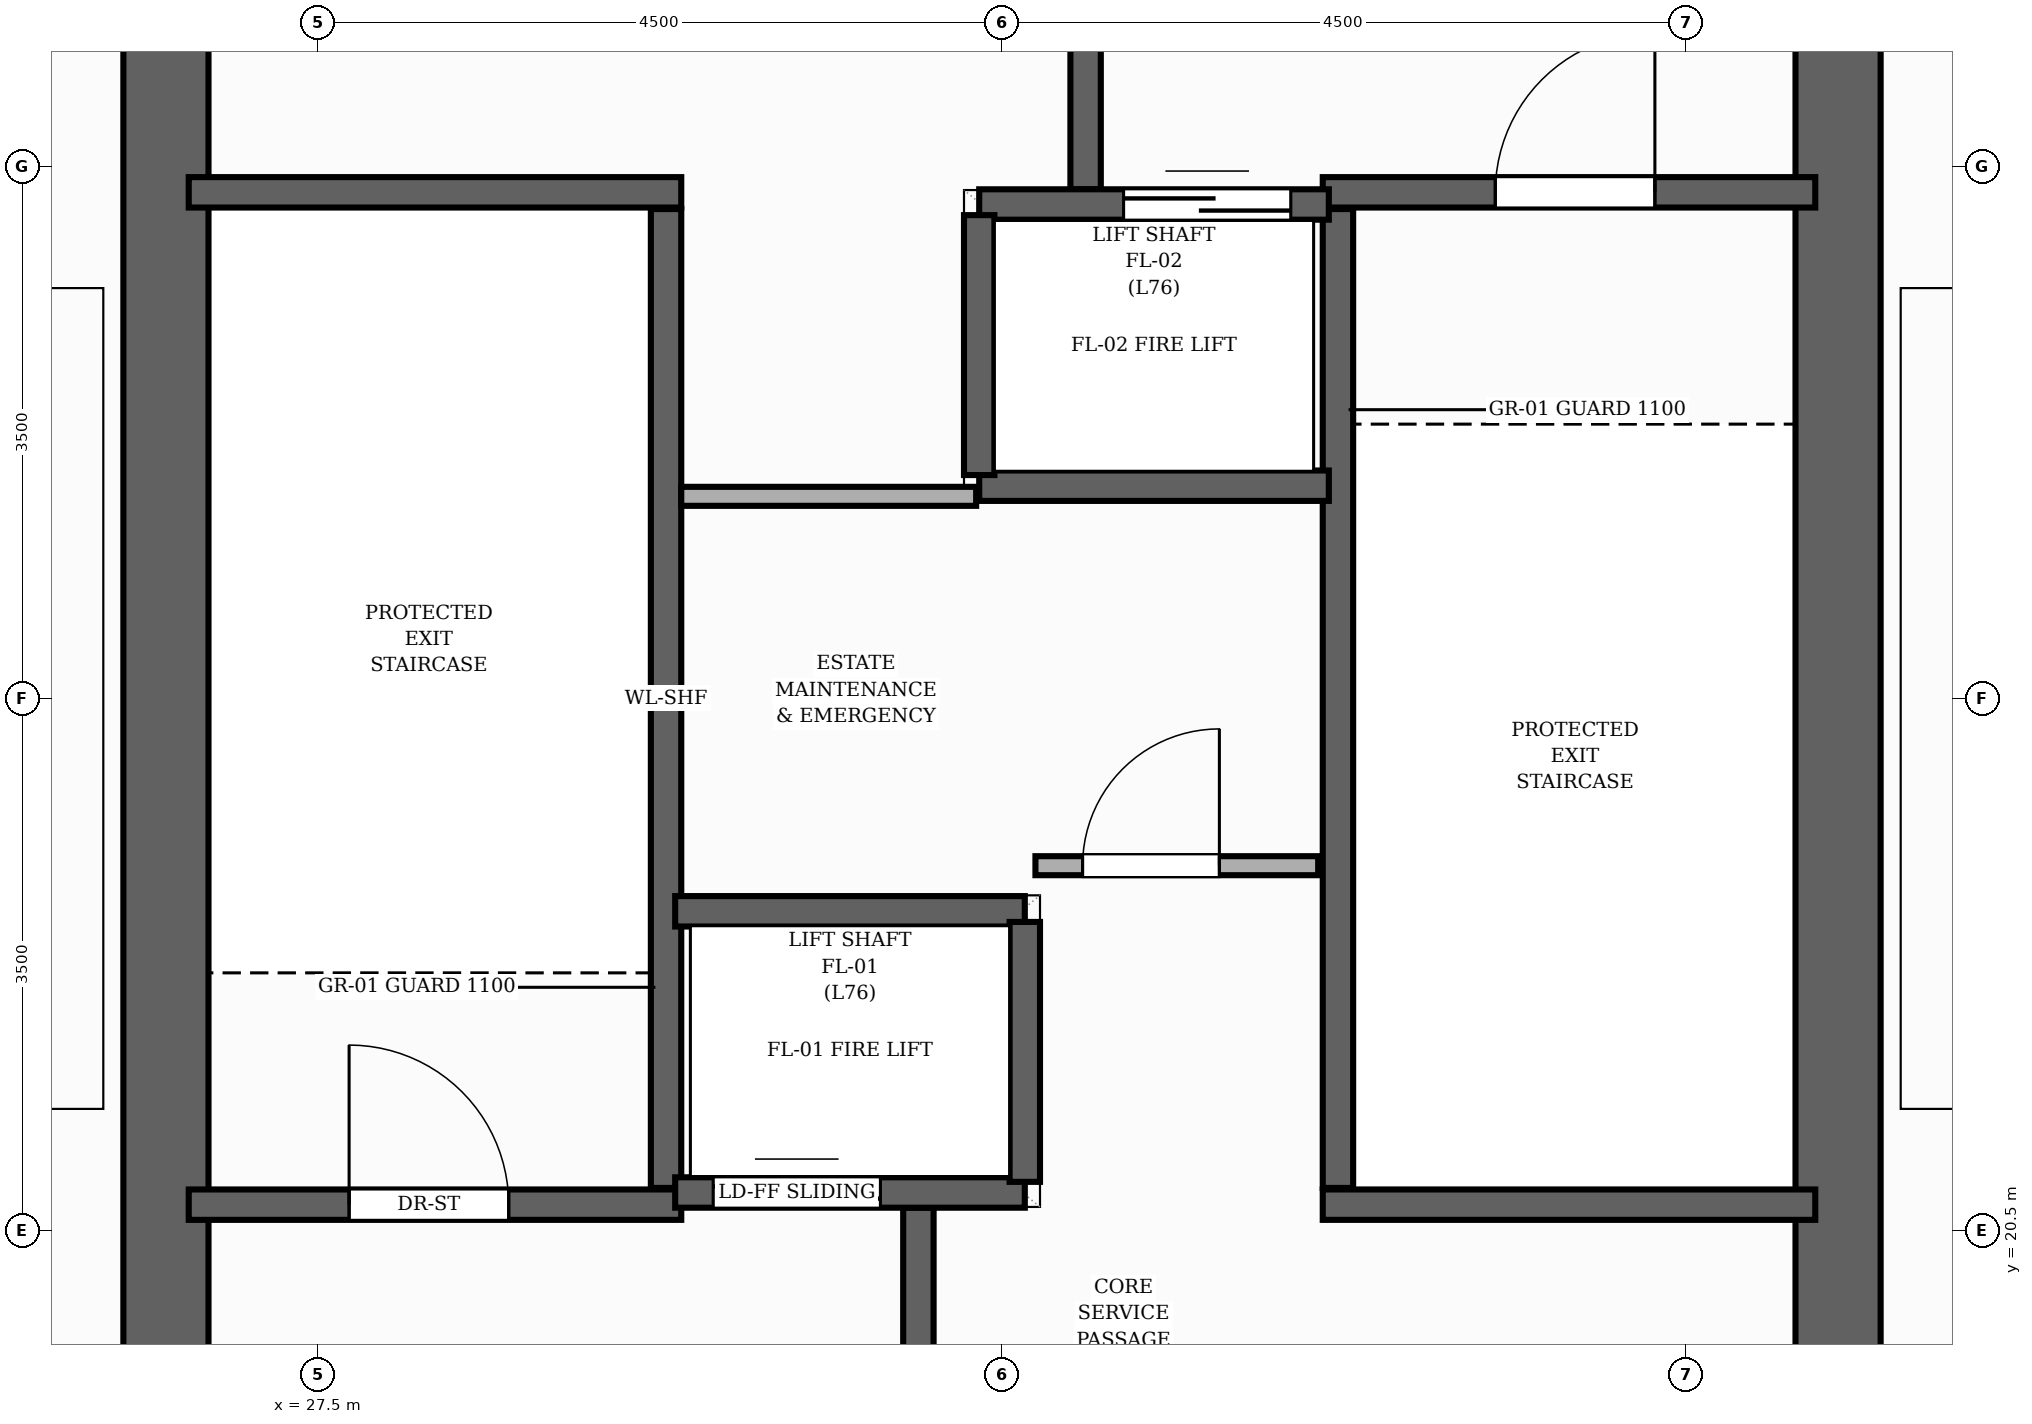
"""IFC4 building model, lengths in metres.
Left out: names, types, materials, properties, quantities, classifications, styles, units other than length and angle.
Written with IfcOpenShell. Run it as: python <this file> out.ifc"""

import sys

from ifc_helpers import new_model, si_unit, direction, frame, frame_2d, origin, place, context, subcontext, project, spatial, rectangle, extrude, element, fill, save


model = new_model("IFC4")
c1 = context("Model", 3, precision=1e-05, world=origin(), true_north=direction((0.0, 1.0)))
c2 = subcontext(c1, "Body", "Model", "MODEL_VIEW")
j1 = project(units=[si_unit("LENGTHUNIT", "METRE"), si_unit("PLANEANGLEUNIT", "RADIAN")], contexts=[c1])
p1 = place(None, origin())
s1 = spatial("IfcSite", under=j1, at=p1, CompositionType="ELEMENT")
p2 = place(p1, origin())
s2 = spatial("IfcBuilding", under=s1, at=p2, CompositionType="ELEMENT")
p3 = place(p2, frame((0.0, 0.0, 255.2)))
s3 = spatial("IfcBuildingStorey", under=s2, at=p3, CompositionType="ELEMENT", Elevation=255.2)
for number, where, z_axis, x_axis in (
    (1, (26.5, 17.28, 0.0), (0.0, 0.0, 1.0), (0.0, 1.0, 0.0)),
    (2, (37.5, 17.28, 0.0), (0.0, 0.0, 1.0), (0.0, 1.0, 0.0)),
):
    element("IfcWall", number, at=place(p3, frame(where, z_axis=z_axis, x_axis=x_axis)), inside=s3, PredefinedType="SHEAR", context=c2, shape_type="SweptSolid", body=[
        extrude(rectangle(XDim=13.44, YDim=0.56, at=frame_2d((6.72, 0.0))), origin(), (0.0, 0.0, 1.0), 4.16),
    ])
p4 = place(p3, frame((29.79, 20.78, 0.0), z_axis=(0.0, 0.0, 1.0), x_axis=(0.0, 1.0, 0.0)))
e3 = element("IfcWall", 3, at=p4, inside=s3, PredefinedType="SHEAR", context=c2, shape_type="SweptSolid", body=[
    extrude(rectangle(XDim=6.44, YDim=0.2, at=frame_2d((3.22, 0.0))), origin(), (0.0, 0.0, 1.0), 4.16),
])
p5 = place(p3, frame((26.65, 27.33, 0.0), z_axis=(0.0, 0.0, 1.0), x_axis=(1.0, 0.0, 0.0)))
e4 = element("IfcWall", 4, at=p5, inside=s3, PredefinedType="SHEAR", context=c2, shape_type="SweptSolid", body=[
    extrude(rectangle(XDim=3.24, YDim=0.2, at=frame_2d((1.62, 0.0))), origin(), (0.0, 0.0, 1.0), 4.16),
])
p6 = place(p3, frame((26.65, 20.67, 0.0), z_axis=(0.0, 0.0, 1.0), x_axis=(1.0, 0.0, 0.0)))
e5 = element("IfcWall", 5, at=p6, inside=s3, PredefinedType="SHEAR", context=c2, shape_type="SweptSolid", body=[
    extrude(rectangle(XDim=3.24, YDim=0.2, at=frame_2d((1.62, 0.0))), origin(), (0.0, 0.0, 1.0), 4.16),
])
p7 = place(p6, frame((1.055, 0.0, 0.0)))
e6 = element("IfcOpeningElement", 6, at=p7, cuts=e5, PredefinedType="OPENING", context=c2, shape_type="SweptSolid", body=[
    extrude(rectangle(XDim=1.05, YDim=2.15, at=frame_2d((0.525, 1.075))), frame((0.0, 0.11, 0.0), z_axis=(0.0, -1.0, 0.0), x_axis=(1.0, 0.0, 0.0)), (0.0, 0.0, 1.0), 0.22),
])
p8 = place(p3, frame((34.21, 20.78, 0.0), z_axis=(0.0, 0.0, 1.0), x_axis=(0.0, 1.0, 0.0)))
e7 = element("IfcWall", 7, at=p8, inside=s3, PredefinedType="SHEAR", context=c2, shape_type="SweptSolid", body=[
    extrude(rectangle(XDim=6.44, YDim=0.2, at=frame_2d((3.22, 0.0))), origin(), (0.0, 0.0, 1.0), 4.16),
])
p9 = place(p3, frame((34.11, 20.67, 0.0), z_axis=(0.0, 0.0, 1.0), x_axis=(1.0, 0.0, 0.0)))
e8 = element("IfcWall", 8, at=p9, inside=s3, PredefinedType="SHEAR", context=c2, shape_type="SweptSolid", body=[
    extrude(rectangle(XDim=3.24, YDim=0.2, at=frame_2d((1.62, 0.0))), origin(), (0.0, 0.0, 1.0), 4.16),
])
p10 = place(p3, frame((34.11, 27.33, 0.0), z_axis=(0.0, 0.0, 1.0), x_axis=(1.0, 0.0, 0.0)))
e9 = element("IfcWall", 9, at=p10, inside=s3, PredefinedType="SHEAR", context=c2, shape_type="SweptSolid", body=[
    extrude(rectangle(XDim=3.24, YDim=0.2, at=frame_2d((1.62, 0.0))), origin(), (0.0, 0.0, 1.0), 4.16),
])
p11 = place(p10, frame((1.135, 0.0, 0.0)))
e10 = element("IfcOpeningElement", 10, at=p11, cuts=e9, PredefinedType="OPENING", context=c2, shape_type="SweptSolid", body=[
    extrude(rectangle(XDim=1.05, YDim=2.15, at=frame_2d((0.525, 1.075))), frame((0.0, 0.11, 0.0), z_axis=(0.0, -1.0, 0.0), x_axis=(1.0, 0.0, 0.0)), (0.0, 0.0, 1.0), 0.22),
])
for number, where, z_axis, x_axis in (
    (11, (31.45, 17.15, 0.0), (0.0, 0.0, 1.0), (0.0, 1.0, 0.0)),
    (12, (32.55, 27.35, 0.0), (0.0, 0.0, 1.0), (0.0, 1.0, 0.0)),
):
    element("IfcWall", number, at=place(p3, frame(where, z_axis=z_axis, x_axis=x_axis)), inside=s3, PredefinedType="SHEAR", context=c2, shape_type="SweptSolid", body=[
        extrude(rectangle(XDim=3.5, YDim=0.2, at=frame_2d((1.75, 0.0))), origin(), (0.0, 0.0, 1.0), 4.16),
    ])
p12 = place(p3, frame((29.85, 20.75, 0.0), z_axis=(0.0, 0.0, 1.0), x_axis=(1.0, 0.0, 0.0)))
e13 = element("IfcWall", 13, at=p12, inside=s3, PredefinedType="SHEAR", context=c2, shape_type="SweptSolid", body=[
    extrude(rectangle(XDim=2.3, YDim=0.2, at=frame_2d((1.15, 0.0))), origin(), (0.0, 0.0, 1.0), 4.16),
])
p13 = place(p12, frame((0.25, 0.0, 0.0)))
e14 = element("IfcOpeningElement", 14, at=p13, cuts=e13, PredefinedType="OPENING", context=c2, shape_type="SweptSolid", body=[
    extrude(rectangle(XDim=1.1, YDim=2.15, at=frame_2d((0.55, 1.075))), frame((0.0, 0.11, 0.0), z_axis=(0.0, -1.0, 0.0), x_axis=(1.0, 0.0, 0.0)), (0.0, 0.0, 1.0), 0.22),
])
p14 = place(p3, frame((29.85, 22.6, 0.0), z_axis=(0.0, 0.0, 1.0), x_axis=(1.0, 0.0, 0.0)))
e15 = element("IfcWall", 15, at=p14, inside=s3, PredefinedType="SHEAR", context=c2, shape_type="SweptSolid", body=[
    extrude(rectangle(XDim=2.3, YDim=0.2, at=frame_2d((1.15, 0.0))), origin(), (0.0, 0.0, 1.0), 4.16),
])
p15 = place(p3, frame((32.15, 20.82, 0.0), z_axis=(0.0, 0.0, 1.0), x_axis=(0.0, 1.0, 0.0)))
e16 = element("IfcWall", 16, at=p15, inside=s3, PredefinedType="SHEAR", context=c2, shape_type="SweptSolid", body=[
    extrude(rectangle(XDim=1.71, YDim=0.2, at=frame_2d((0.855, 0.0))), origin(), (0.0, 0.0, 1.0), 4.16),
])
p16 = place(p3, frame((31.85, 27.25, 0.0), z_axis=(0.0, 0.0, 1.0), x_axis=(1.0, 0.0, 0.0)))
e17 = element("IfcWall", 17, at=p16, inside=s3, PredefinedType="SHEAR", context=c2, shape_type="SweptSolid", body=[
    extrude(rectangle(XDim=2.3, YDim=0.2, at=frame_2d((1.15, 0.0))), origin(), (0.0, 0.0, 1.0), 4.16),
])
p17 = place(p16, frame((0.95, 0.0, 0.0)))
e18 = element("IfcOpeningElement", 18, at=p17, cuts=e17, PredefinedType="OPENING", context=c2, shape_type="SweptSolid", body=[
    extrude(rectangle(XDim=1.1, YDim=2.15, at=frame_2d((0.55, 1.075))), frame((0.0, 0.11, 0.0), z_axis=(0.0, -1.0, 0.0), x_axis=(1.0, 0.0, 0.0)), (0.0, 0.0, 1.0), 0.22),
])
p18 = place(p3, frame((31.85, 25.4, 0.0), z_axis=(0.0, 0.0, 1.0), x_axis=(1.0, 0.0, 0.0)))
e19 = element("IfcWall", 19, at=p18, inside=s3, PredefinedType="SHEAR", context=c2, shape_type="SweptSolid", body=[
    extrude(rectangle(XDim=2.3, YDim=0.2, at=frame_2d((1.15, 0.0))), origin(), (0.0, 0.0, 1.0), 4.16),
])
p19 = place(p3, frame((31.85, 25.47, 0.0), z_axis=(0.0, 0.0, 1.0), x_axis=(0.0, 1.0, 0.0)))
e20 = element("IfcWall", 20, at=p19, inside=s3, PredefinedType="SHEAR", context=c2, shape_type="SweptSolid", body=[
    extrude(rectangle(XDim=1.71, YDim=0.2, at=frame_2d((0.855, 0.0))), origin(), (0.0, 0.0, 1.0), 4.16),
])
p20 = place(p3, frame((32.22, 22.9, 0.0), z_axis=(0.0, 0.0, 1.0), x_axis=(1.0, 0.0, 0.0)))
e21 = element("IfcWall", 21, at=p20, inside=s3, PredefinedType="PARTITIONING", context=c2, shape_type="SweptSolid", body=[
    extrude(rectangle(XDim=1.86, YDim=0.125, at=frame_2d((0.93, 0.0))), origin(), (0.0, 0.0, 1.0), 3.905),
])
p21 = place(p20, frame((0.31, 0.0, 0.0)))
e22 = element("IfcOpeningElement", 22, at=p21, cuts=e21, PredefinedType="OPENING", context=c2, shape_type="SweptSolid", body=[
    extrude(rectangle(XDim=0.9, YDim=2.1, at=frame_2d((0.45, 1.05))), frame((0.0, 0.073, 0.0), z_axis=(0.0, -1.0, 0.0), x_axis=(1.0, 0.0, 0.0)), (0.0, 0.0, 1.0), 0.145),
])
p22 = place(p3, frame((29.89, 25.33, 0.0), z_axis=(0.0, 0.0, 1.0), x_axis=(1.0, 0.0, 0.0)))
e23 = element("IfcWall", 23, at=p22, inside=s3, PredefinedType="PARTITIONING", context=c2, shape_type="SweptSolid", body=[
    extrude(rectangle(XDim=1.94, YDim=0.125, at=frame_2d((0.97, 0.0))), origin(), (0.0, 0.0, 1.0), 3.905),
])
p23 = place(p3, frame((25.85, 13.32, 0.0), z_axis=(0.0, 0.0, 1.0), x_axis=(0.0, 1.0, 0.0)))
e24 = element("IfcWall", 24, at=p23, inside=s3, PredefinedType="PARTITIONING", context=c2, shape_type="SweptSolid", body=[
    extrude(rectangle(XDim=20.152, YDim=0.18, at=frame_2d((10.076, 0.0))), origin(), (0.0, 0.0, 1.0), 3.905),
])
p24 = place(p23, frame((9.626, 0.0, 0.0)))
e25 = element("IfcOpeningElement", 25, at=p24, cuts=e24, PredefinedType="OPENING", context=c2, shape_type="SweptSolid", body=[
    extrude(rectangle(XDim=0.9, YDim=2.1, at=frame_2d((0.45, 1.05))), frame((0.0, 0.1, 0.0), z_axis=(0.0, -1.0, 0.0), x_axis=(1.0, 0.0, 0.0)), (0.0, 0.0, 1.0), 0.2),
])
p25 = place(p3, frame((38.15, 34.68, 0.0), z_axis=(0.0, 0.0, 1.0), x_axis=(0.0, -1.0, 0.0)))
e26 = element("IfcWall", 26, at=p25, inside=s3, PredefinedType="PARTITIONING", context=c2, shape_type="SweptSolid", body=[
    extrude(rectangle(XDim=20.152, YDim=0.18, at=frame_2d((10.076, 0.0))), origin(), (0.0, 0.0, 1.0), 3.905),
])
p26 = place(p25, frame((9.626, 0.0, 0.0)))
e27 = element("IfcOpeningElement", 27, at=p26, cuts=e26, PredefinedType="OPENING", context=c2, shape_type="SweptSolid", body=[
    extrude(rectangle(XDim=0.9, YDim=2.1, at=frame_2d((0.45, 1.05))), frame((0.0, 0.1, 0.0), z_axis=(0.0, -1.0, 0.0), x_axis=(1.0, 0.0, 0.0)), (0.0, 0.0, 1.0), 0.2),
])
p27 = place(p7, origin())
e28 = element("IfcDoor", 28, at=p27, inside=s3, OperationType="SINGLE_SWING_LEFT", PredefinedType="DOOR", context=c2, shape_type="SweptSolid", body=[
    extrude(rectangle(XDim=1.05, YDim=2.15, at=frame_2d((0.525, 1.075))), frame((0.0, 0.025, 0.0), z_axis=(0.0, -1.0, 0.0), x_axis=(1.0, 0.0, 0.0)), (0.0, 0.0, 1.0), 0.05),
])
fill(e6, e28)
p28 = place(p11, origin())
e29 = element("IfcDoor", 29, at=p28, inside=s3, OperationType="SINGLE_SWING_RIGHT", PredefinedType="DOOR", context=c2, shape_type="SweptSolid", body=[
    extrude(rectangle(XDim=1.05, YDim=2.15, at=frame_2d((0.525, 1.075))), frame((0.0, 0.025, 0.0), z_axis=(0.0, -1.0, 0.0), x_axis=(1.0, 0.0, 0.0)), (0.0, 0.0, 1.0), 0.05),
])
fill(e10, e29)
p29 = place(p13, origin())
e30 = element("IfcDoor", 30, at=p29, inside=s3, OperationType="DOUBLE_DOOR_SLIDING", PredefinedType="DOOR", context=c2, shape_type="SweptSolid", body=[
    extrude(rectangle(XDim=1.1, YDim=2.15, at=frame_2d((0.55, 1.075))), frame((0.0, 0.025, 0.0), z_axis=(0.0, -1.0, 0.0), x_axis=(1.0, 0.0, 0.0)), (0.0, 0.0, 1.0), 0.05),
])
fill(e14, e30)
p30 = place(p17, origin())
e31 = element("IfcDoor", 31, at=p30, inside=s3, OperationType="DOUBLE_DOOR_SLIDING", PredefinedType="DOOR", context=c2, shape_type="SweptSolid", body=[
    extrude(rectangle(XDim=1.1, YDim=2.15, at=frame_2d((0.55, 1.075))), frame((0.0, 0.025, 0.0), z_axis=(0.0, -1.0, 0.0), x_axis=(1.0, 0.0, 0.0)), (0.0, 0.0, 1.0), 0.05),
])
fill(e18, e31)
p31 = place(p21, origin())
e32 = element("IfcDoor", 32, at=p31, inside=s3, OperationType="SINGLE_SWING_RIGHT", PredefinedType="DOOR", context=c2, shape_type="SweptSolid", body=[
    extrude(rectangle(XDim=0.9, YDim=2.1, at=frame_2d((0.45, 1.05))), frame((0.0, 0.025, 0.0), z_axis=(0.0, -1.0, 0.0), x_axis=(1.0, 0.0, 0.0)), (0.0, 0.0, 1.0), 0.05),
])
fill(e22, e32)
p32 = place(p24, origin())
e33 = element("IfcDoor", 33, at=p32, inside=s3, OperationType="SINGLE_SWING_LEFT", PredefinedType="DOOR", context=c2, shape_type="SweptSolid", body=[
    extrude(rectangle(XDim=0.9, YDim=2.1, at=frame_2d((0.45, 1.05))), frame((0.0, 0.025, 0.0), z_axis=(0.0, -1.0, 0.0), x_axis=(1.0, 0.0, 0.0)), (0.0, 0.0, 1.0), 0.05),
])
fill(e25, e33)
p33 = place(p26, origin())
e34 = element("IfcDoor", 34, at=p33, inside=s3, OperationType="SINGLE_SWING_RIGHT", PredefinedType="DOOR", context=c2, shape_type="SweptSolid", body=[
    extrude(rectangle(XDim=0.9, YDim=2.1, at=frame_2d((0.45, 1.05))), frame((0.0, 0.025, 0.0), z_axis=(0.0, -1.0, 0.0), x_axis=(1.0, 0.0, 0.0)), (0.0, 0.0, 1.0), 0.05),
])
fill(e27, e34)
save(model, sys.argv[1])
